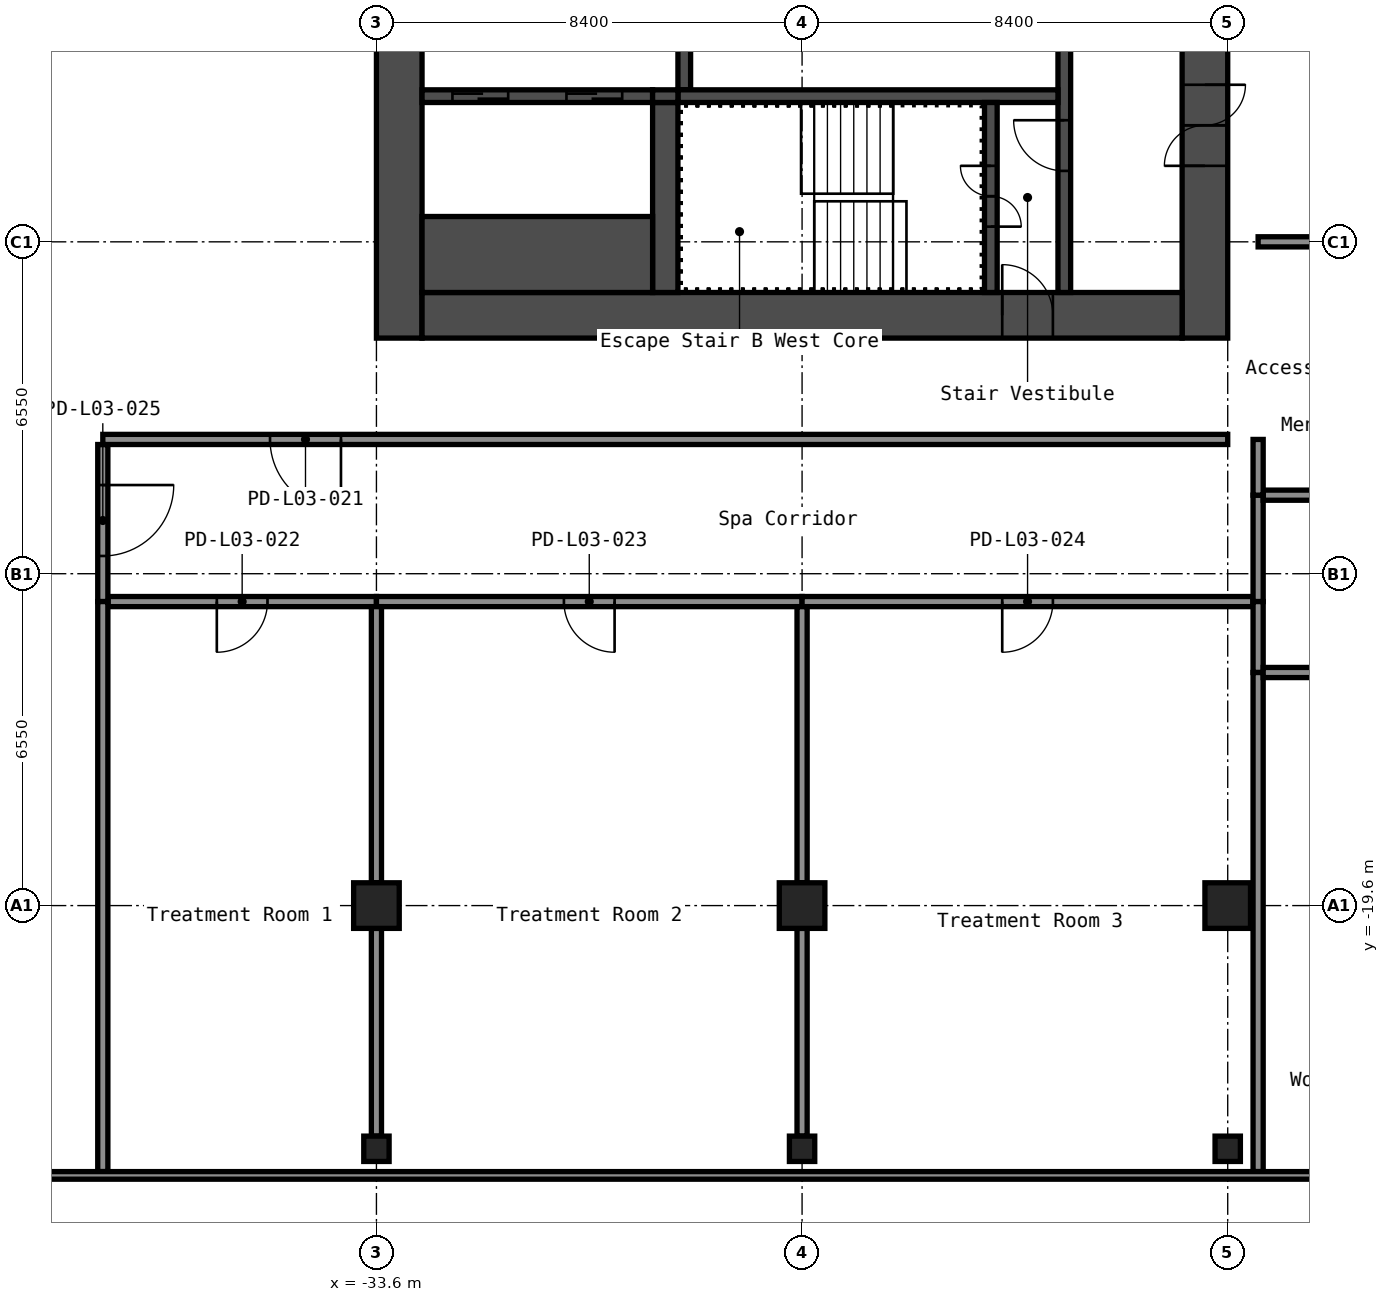
"""IFC4 building model, lengths in metres.
Left out: names, types, materials, properties, quantities, classifications, styles, units other than length and angle.
Written with IfcOpenShell. Run it as: python <this file> out.ifc"""

import sys

from ifc_helpers import new_model, si_unit, direction, frame, frame_2d, origin, origin_2d, place, context, subcontext, project, spatial, rectangle, hollow_rectangle, extrude, element, fill, save


model = new_model("IFC4")
c1 = context("Model", 3, precision=1e-05, world=origin(), true_north=direction((0.0, 1.0)))
c2 = subcontext(c1, "Body", "Model", "MODEL_VIEW")
j1 = project(units=[si_unit("LENGTHUNIT", "METRE"), si_unit("PLANEANGLEUNIT", "RADIAN")], contexts=[c1])
p1 = place(None, origin())
s1 = spatial("IfcSite", under=j1, at=p1, CompositionType="ELEMENT")
p2 = place(p1, origin())
s2 = spatial("IfcBuilding", under=s1, at=p2, CompositionType="ELEMENT")
p3 = place(p2, frame((0.0, 0.0, 15.0)))
s3 = spatial("IfcBuildingStorey", under=s2, at=p3, CompositionType="ELEMENT", Elevation=15.0)
for number, where, z_axis, x_axis in (
    (1, (-33.6, -19.6, 0.0), (0.0, 0.0, 1.0), (1.0, 0.0, 0.0)),
    (2, (-25.2, -19.6, 0.0), (0.0, 0.0, 1.0), (1.0, 0.0, 0.0)),
    (3, (-16.8, -19.6, 0.0), (0.0, 0.0, 1.0), (1.0, 0.0, 0.0)),
):
    element("IfcColumn", number, at=place(p3, frame(where, z_axis=z_axis, x_axis=x_axis)), inside=s3, PredefinedType="COLUMN", context=c2, shape_type="SweptSolid", body=[
        extrude(hollow_rectangle(XDim=0.9, YDim=0.9, WallThickness=0.036, at=origin_2d()), origin(), (0.0, 0.0, 1.0), 4.4),
    ])
for number, where, z_axis, x_axis in (
    (4, (-33.6, -24.4, 0.0), (0.0, 0.0, 1.0), (1.0, 0.0, 0.0)),
    (5, (-25.2, -24.4, 0.0), (0.0, 0.0, 1.0), (1.0, 0.0, 0.0)),
    (6, (-16.8, -24.4, 0.0), (0.0, 0.0, 1.0), (1.0, 0.0, 0.0)),
):
    element("IfcColumn", number, at=place(p3, frame(where, z_axis=z_axis, x_axis=x_axis)), inside=s3, PredefinedType="COLUMN", context=c2, shape_type="SweptSolid", body=[
        extrude(hollow_rectangle(XDim=0.5, YDim=0.5, WallThickness=0.019, InnerFilletRadius=0.029, OuterFilletRadius=0.048, at=origin_2d()), origin(), (0.0, 0.0, 1.0), 4.4),
    ])
p4 = place(p3, frame((-17.25, -8.4, 0.0), z_axis=(0.0, 0.0, 1.0), x_axis=(0.0, 1.0, 0.0)))
e7 = element("IfcWall", 7, at=p4, inside=s3, PredefinedType="SHEAR", context=c2, shape_type="SweptSolid", body=[
    extrude(rectangle(XDim=16.8, YDim=0.9, at=frame_2d((8.4, 0.0))), origin(), (0.0, 0.0, 1.0), 4.4),
])
p5 = place(p4, frame((3.4, 0.0, 0.0)))
e8 = element("IfcOpeningElement", 8, at=p5, cuts=e7, PredefinedType="OPENING", context=c2, shape_type="SweptSolid", body=[
    extrude(rectangle(XDim=1.6, YDim=2.1, at=frame_2d((0.8, 1.05))), frame((0.0, 0.46, 0.0), z_axis=(0.0, -1.0, 0.0), x_axis=(1.0, 0.0, 0.0)), (0.0, 0.0, 1.0), 0.92),
])
p6 = place(p4, frame((9.6, 0.0, 0.0)))
e9 = element("IfcOpeningElement", 9, at=p6, cuts=e7, PredefinedType="OPENING", context=c2, shape_type="SweptSolid", body=[
    extrude(rectangle(XDim=1.6, YDim=2.1, at=frame_2d((0.8, 1.05))), frame((0.0, 0.46, 0.0), z_axis=(0.0, -1.0, 0.0), x_axis=(1.0, 0.0, 0.0)), (0.0, 0.0, 1.0), 0.92),
])
p7 = place(p4, frame((11.8, 0.0, 0.0)))
e10 = element("IfcOpeningElement", 10, at=p7, cuts=e7, PredefinedType="OPENING", context=c2, shape_type="SweptSolid", body=[
    extrude(rectangle(XDim=1.6, YDim=2.1, at=frame_2d((0.8, 1.05))), frame((0.0, 0.46, 0.0), z_axis=(0.0, -1.0, 0.0), x_axis=(1.0, 0.0, 0.0)), (0.0, 0.0, 1.0), 0.92),
])
p8 = place(p3, frame((-33.15, -8.4, 0.0), z_axis=(0.0, 0.0, 1.0), x_axis=(0.0, 1.0, 0.0)))
e11 = element("IfcWall", 11, at=p8, inside=s3, PredefinedType="SHEAR", context=c2, shape_type="SweptSolid", body=[
    extrude(rectangle(XDim=16.8, YDim=0.9, at=frame_2d((8.4, 0.0))), origin(), (0.0, 0.0, 1.0), 4.4),
])
p9 = place(p3, frame((-32.7, -7.95, 0.0), z_axis=(0.0, 0.0, 1.0), x_axis=(1.0, 0.0, 0.0)))
e12 = element("IfcWall", 12, at=p9, inside=s3, PredefinedType="SHEAR", context=c2, shape_type="SweptSolid", body=[
    extrude(rectangle(XDim=15.0, YDim=0.9, at=frame_2d((7.5, 0.0))), origin(), (0.0, 0.0, 1.0), 4.4),
])
p10 = place(p9, frame((11.45, 0.0, 0.0)))
e13 = element("IfcOpeningElement", 13, at=p10, cuts=e12, PredefinedType="OPENING", context=c2, shape_type="SweptSolid", body=[
    extrude(rectangle(XDim=1.0, YDim=2.1, at=frame_2d((0.5, 1.05))), frame((0.0, 0.46, 0.0), z_axis=(0.0, -1.0, 0.0), x_axis=(1.0, 0.0, 0.0)), (0.0, 0.0, 1.0), 0.92),
])
p11 = place(p3, frame((-20.025, -7.5, 0.0), z_axis=(0.0, 0.0, 1.0), x_axis=(0.0, 1.0, 0.0)))
e14 = element("IfcWall", 14, at=p11, inside=s3, PredefinedType="SHEAR", context=c2, shape_type="SweptSolid", body=[
    extrude(rectangle(XDim=6.3, YDim=0.25, at=frame_2d((3.15, 0.0))), origin(), (0.0, 0.0, 1.0), 4.4),
])
p12 = place(p11, frame((2.4, 0.0, 0.0)))
e15 = element("IfcOpeningElement", 15, at=p12, cuts=e14, PredefinedType="OPENING", context=c2, shape_type="SweptSolid", body=[
    extrude(rectangle(XDim=1.0, YDim=2.1, at=frame_2d((0.5, 1.05))), frame((0.0, 0.135, 0.0), z_axis=(0.0, -1.0, 0.0), x_axis=(1.0, 0.0, 0.0)), (0.0, 0.0, 1.0), 0.27),
])
p13 = place(p3, frame((-27.525, -3.5, 0.0), z_axis=(0.0, 0.0, 1.0), x_axis=(0.0, 1.0, 0.0)))
e16 = element("IfcWall", 16, at=p13, inside=s3, PredefinedType="SHEAR", context=c2, shape_type="SweptSolid", body=[
    extrude(rectangle(XDim=2.05, YDim=0.25, at=frame_2d((1.025, 0.0))), origin(), (0.0, 0.0, 1.0), 4.4),
])
p14 = place(p3, frame((-27.65, -3.625, 0.0), z_axis=(0.0, 0.0, 1.0), x_axis=(1.0, 0.0, 0.0)))
e17 = element("IfcWall", 17, at=p14, inside=s3, PredefinedType="SHEAR", context=c2, shape_type="SweptSolid", body=[
    extrude(rectangle(XDim=7.5, YDim=0.25, at=frame_2d((3.75, 0.0))), origin(), (0.0, 0.0, 1.0), 4.4),
])
p15 = place(p3, frame((-21.475, -7.5, 0.0), z_axis=(0.0, 0.0, 1.0), x_axis=(0.0, 1.0, 0.0)))
e18 = element("IfcWall", 18, at=p15, inside=s3, PredefinedType="SHEAR", context=c2, shape_type="SweptSolid", body=[
    extrude(rectangle(XDim=3.75, YDim=0.25, at=frame_2d((1.875, 0.0))), origin(), (0.0, 0.0, 1.0), 4.4),
])
p16 = place(p15, frame((1.3, 0.0, 0.0)))
e19 = element("IfcOpeningElement", 19, at=p16, cuts=e18, PredefinedType="OPENING", context=c2, shape_type="SweptSolid", body=[
    extrude(rectangle(XDim=1.2, YDim=2.1, at=frame_2d((0.6, 1.05))), frame((0.0, 0.135, 0.0), z_axis=(0.0, -1.0, 0.0), x_axis=(1.0, 0.0, 0.0)), (0.0, 0.0, 1.0), 0.27),
])
p17 = place(p3, frame((-27.9, -7.5, 0.0), z_axis=(0.0, 0.0, 1.0), x_axis=(0.0, 1.0, 0.0)))
e20 = element("IfcWall", 20, at=p17, inside=s3, PredefinedType="SHEAR", context=c2, shape_type="SweptSolid", body=[
    extrude(rectangle(XDim=3.75, YDim=0.5, at=frame_2d((1.875, 0.0))), origin(), (0.0, 0.0, 1.0), 4.4),
])
p18 = place(p3, frame((-32.7, -3.625, 0.0), z_axis=(0.0, 0.0, 1.0), x_axis=(1.0, 0.0, 0.0)))
e21 = element("IfcWall", 21, at=p18, inside=s3, PredefinedType="SHEAR", context=c2, shape_type="SweptSolid", body=[
    extrude(rectangle(XDim=4.55, YDim=0.25, at=frame_2d((2.275, 0.0))), origin(), (0.0, 0.0, 1.0), 4.4),
])
p19 = place(p18, frame((2.85, 0.0, 0.0)))
e22 = element("IfcOpeningElement", 22, at=p19, cuts=e21, PredefinedType="OPENING", context=c2, shape_type="SweptSolid", body=[
    extrude(rectangle(XDim=1.1, YDim=2.1, at=frame_2d((0.55, 1.05))), frame((0.0, 0.135, 0.0), z_axis=(0.0, -1.0, 0.0), x_axis=(1.0, 0.0, 0.0)), (0.0, 0.0, 1.0), 0.27),
])
p20 = place(p18, frame((0.6, 0.0, 0.0)))
e23 = element("IfcOpeningElement", 23, at=p20, cuts=e21, PredefinedType="OPENING", context=c2, shape_type="SweptSolid", body=[
    extrude(rectangle(XDim=1.1, YDim=2.1, at=frame_2d((0.55, 1.05))), frame((0.0, 0.135, 0.0), z_axis=(0.0, -1.0, 0.0), x_axis=(1.0, 0.0, 0.0)), (0.0, 0.0, 1.0), 0.27),
])
p21 = place(p3, frame((-32.7, -6.75, 0.0), z_axis=(0.0, 0.0, 1.0), x_axis=(1.0, 0.0, 0.0)))
e24 = element("IfcWall", 24, at=p21, inside=s3, PredefinedType="SHEAR", context=c2, shape_type="SweptSolid", body=[
    extrude(rectangle(XDim=4.55, YDim=1.5, at=frame_2d((2.275, 0.0))), origin(), (0.0, 0.0, 1.0), 4.4),
])
p22 = place(p3, frame((-28.15, -3.625, 0.0), z_axis=(0.0, 0.0, 1.0), x_axis=(1.0, 0.0, 0.0)))
e25 = element("IfcWall", 25, at=p22, inside=s3, PredefinedType="SHEAR", context=c2, shape_type="SweptSolid", body=[
    extrude(rectangle(XDim=0.5, YDim=0.25, at=frame_2d((0.25, 0.0))), origin(), (0.0, 0.0, 1.0), 4.4),
])
p23 = place(p3, frame((-33.6, -13.6, 0.0), z_axis=(0.0, 0.0, 1.0), x_axis=(-1.0, 0.0, 0.0)))
e26 = element("IfcWall", 26, at=p23, inside=s3, PredefinedType="PARTITIONING", context=c2, shape_type="SweptSolid", body=[
    extrude(rectangle(XDim=5.3, YDim=0.2, at=frame_2d((2.65, 0.0))), origin(), (0.0, 0.0, 1.0), 4.4),
])
p24 = place(p23, frame((2.15, 0.0, 0.0)))
e27 = element("IfcOpeningElement", 27, at=p24, cuts=e26, PredefinedType="OPENING", context=c2, shape_type="SweptSolid", body=[
    extrude(rectangle(XDim=1.0, YDim=2.1, at=frame_2d((0.5, 1.05))), frame((0.0, 0.11, 0.0), z_axis=(0.0, -1.0, 0.0), x_axis=(1.0, 0.0, 0.0)), (0.0, 0.0, 1.0), 0.22),
])
p25 = place(p3, frame((-25.2, -13.6, 0.0), z_axis=(0.0, 0.0, 1.0), x_axis=(-1.0, 0.0, 0.0)))
e28 = element("IfcWall", 28, at=p25, inside=s3, PredefinedType="PARTITIONING", context=c2, shape_type="SweptSolid", body=[
    extrude(rectangle(XDim=8.4, YDim=0.2, at=frame_2d((4.2, 0.0))), origin(), (0.0, 0.0, 1.0), 4.4),
])
p26 = place(p25, frame((3.7, 0.0, 0.0)))
e29 = element("IfcOpeningElement", 29, at=p26, cuts=e28, PredefinedType="OPENING", context=c2, shape_type="SweptSolid", body=[
    extrude(rectangle(XDim=1.0, YDim=2.1, at=frame_2d((0.5, 1.05))), frame((0.0, 0.11, 0.0), z_axis=(0.0, -1.0, 0.0), x_axis=(1.0, 0.0, 0.0)), (0.0, 0.0, 1.0), 0.22),
])
p27 = place(p3, frame((-16.3, -13.6, 0.0), z_axis=(0.0, 0.0, 1.0), x_axis=(-1.0, 0.0, 0.0)))
e30 = element("IfcWall", 30, at=p27, inside=s3, PredefinedType="PARTITIONING", context=c2, shape_type="SweptSolid", body=[
    extrude(rectangle(XDim=8.9, YDim=0.2, at=frame_2d((4.45, 0.0))), origin(), (0.0, 0.0, 1.0), 4.4),
])
p28 = place(p27, frame((3.95, 0.0, 0.0)))
e31 = element("IfcOpeningElement", 31, at=p28, cuts=e30, PredefinedType="OPENING", context=c2, shape_type="SweptSolid", body=[
    extrude(rectangle(XDim=1.0, YDim=2.1, at=frame_2d((0.5, 1.05))), frame((0.0, 0.11, 0.0), z_axis=(0.0, -1.0, 0.0), x_axis=(1.0, 0.0, 0.0)), (0.0, 0.0, 1.0), 0.22),
])
p29 = place(p3, frame((-33.6, -13.7, 0.0), z_axis=(0.0, 0.0, 1.0), x_axis=(0.0, -1.0, 0.0)))
e32 = element("IfcWall", 32, at=p29, inside=s3, PredefinedType="PARTITIONING", context=c2, shape_type="SweptSolid", body=[
    extrude(rectangle(XDim=5.45, YDim=0.2, at=frame_2d((2.725, 0.0))), origin(), (0.0, 0.0, 1.0), 4.4),
])
p30 = place(p3, frame((-33.6, -20.05, 0.0), z_axis=(0.0, 0.0, 1.0), x_axis=(0.0, -1.0, 0.0)))
e33 = element("IfcWall", 33, at=p30, inside=s3, PredefinedType="PARTITIONING", context=c2, shape_type="SweptSolid", body=[
    extrude(rectangle(XDim=4.1, YDim=0.2, at=frame_2d((2.05, 0.0))), origin(), (0.0, 0.0, 1.0), 4.4),
])
p31 = place(p3, frame((-25.2, -13.7, 0.0), z_axis=(0.0, 0.0, 1.0), x_axis=(0.0, -1.0, 0.0)))
e34 = element("IfcWall", 34, at=p31, inside=s3, PredefinedType="PARTITIONING", context=c2, shape_type="SweptSolid", body=[
    extrude(rectangle(XDim=5.45, YDim=0.2, at=frame_2d((2.725, 0.0))), origin(), (0.0, 0.0, 1.0), 4.4),
])
p32 = place(p3, frame((-25.2, -20.05, 0.0), z_axis=(0.0, 0.0, 1.0), x_axis=(0.0, -1.0, 0.0)))
e35 = element("IfcWall", 35, at=p32, inside=s3, PredefinedType="PARTITIONING", context=c2, shape_type="SweptSolid", body=[
    extrude(rectangle(XDim=4.1, YDim=0.2, at=frame_2d((2.05, 0.0))), origin(), (0.0, 0.0, 1.0), 4.4),
])
p33 = place(p3, frame((-16.2, -13.6, 0.0), z_axis=(0.0, 0.0, 1.0), x_axis=(0.0, 1.0, 0.0)))
e36 = element("IfcWall", 36, at=p33, inside=s3, PredefinedType="PARTITIONING", context=c2, shape_type="SweptSolid", body=[
    extrude(rectangle(XDim=2.1, YDim=0.2, at=frame_2d((1.05, 0.0))), origin(), (0.0, 0.0, 1.0), 4.4),
])
p34 = place(p3, frame((-16.2, -15.0, 0.0), z_axis=(0.0, 0.0, 1.0), x_axis=(0.0, 1.0, 0.0)))
e37 = element("IfcWall", 37, at=p34, inside=s3, PredefinedType="PARTITIONING", context=c2, shape_type="SweptSolid", body=[
    extrude(rectangle(XDim=1.4, YDim=0.2, at=frame_2d((0.7, 0.0))), origin(), (0.0, 0.0, 1.0), 4.4),
])
p35 = place(p3, frame((-16.1, -11.5, 0.0), z_axis=(0.0, 0.0, 1.0), x_axis=(1.0, 0.0, 0.0)))
e38 = element("IfcWall", 38, at=p35, inside=s3, PredefinedType="PARTITIONING", context=c2, shape_type="SweptSolid", body=[
    extrude(rectangle(XDim=3.4, YDim=0.2, at=frame_2d((1.7, 0.0))), origin(), (0.0, 0.0, 1.0), 4.4),
])
p36 = place(p3, frame((-16.2, -6.5, 0.0), z_axis=(0.0, 0.0, 1.0), x_axis=(1.0, 0.0, 0.0)))
e39 = element("IfcWall", 39, at=p36, inside=s3, PredefinedType="PARTITIONING", context=c2, shape_type="SweptSolid", body=[
    extrude(rectangle(XDim=3.6, YDim=0.2, at=frame_2d((1.8, 0.0))), origin(), (0.0, 0.0, 1.0), 4.4),
])
p37 = place(p3, frame((-16.2, -11.5, 0.0), z_axis=(0.0, 0.0, 1.0), x_axis=(0.0, 1.0, 0.0)))
e40 = element("IfcWall", 40, at=p37, inside=s3, PredefinedType="PARTITIONING", context=c2, shape_type="SweptSolid", body=[
    extrude(rectangle(XDim=1.1, YDim=0.2, at=frame_2d((0.55, 0.0))), origin(), (0.0, 0.0, 1.0), 4.4),
])
p38 = place(p3, frame((-16.2, -24.85, 0.0), z_axis=(0.0, 0.0, 1.0), x_axis=(0.0, 1.0, 0.0)))
e41 = element("IfcWall", 41, at=p38, inside=s3, PredefinedType="PARTITIONING", context=c2, shape_type="SweptSolid", body=[
    extrude(rectangle(XDim=9.85, YDim=0.2, at=frame_2d((4.925, 0.0))), origin(), (0.0, 0.0, 1.0), 4.4),
])
p39 = place(p3, frame((-16.1, -15.0, 0.0), z_axis=(0.0, 0.0, 1.0), x_axis=(1.0, 0.0, 0.0)))
e42 = element("IfcWall", 42, at=p39, inside=s3, PredefinedType="PARTITIONING", context=c2, shape_type="SweptSolid", body=[
    extrude(rectangle(XDim=3.4, YDim=0.2, at=frame_2d((1.7, 0.0))), origin(), (0.0, 0.0, 1.0), 4.4),
])
p40 = place(p3, frame((-39.0, -10.5, 0.0), z_axis=(0.0, 0.0, 1.0), x_axis=(0.0, -1.0, 0.0)))
e43 = element("IfcWall", 43, at=p40, inside=s3, PredefinedType="PARTITIONING", context=c2, shape_type="SweptSolid", body=[
    extrude(rectangle(XDim=3.1, YDim=0.2, at=frame_2d((1.55, 0.0))), origin(), (0.0, 0.0, 1.0), 4.4),
])
p41 = place(p40, frame((0.8, 0.0, 0.0)))
e44 = element("IfcOpeningElement", 44, at=p41, cuts=e43, PredefinedType="OPENING", context=c2, shape_type="SweptSolid", body=[
    extrude(rectangle(XDim=1.4, YDim=2.1, at=frame_2d((0.7, 1.05))), frame((0.0, 0.11, 0.0), z_axis=(0.0, -1.0, 0.0), x_axis=(1.0, 0.0, 0.0)), (0.0, 0.0, 1.0), 0.22),
])
p42 = place(p3, frame((-16.8, -10.4, 0.0), z_axis=(0.0, 0.0, 1.0), x_axis=(-1.0, 0.0, 0.0)))
e45 = element("IfcWall", 45, at=p42, inside=s3, PredefinedType="PARTITIONING", context=c2, shape_type="SweptSolid", body=[
    extrude(rectangle(XDim=22.2, YDim=0.2, at=frame_2d((11.1, 0.0))), origin(), (0.0, 0.0, 1.0), 4.4),
])
p43 = place(p42, frame((17.5, 0.0, 0.0)))
e46 = element("IfcOpeningElement", 46, at=p43, cuts=e45, PredefinedType="OPENING", context=c2, shape_type="SweptSolid", body=[
    extrude(rectangle(XDim=1.4, YDim=2.1, at=frame_2d((0.7, 1.05))), frame((0.0, 0.11, 0.0), z_axis=(0.0, -1.0, 0.0), x_axis=(1.0, 0.0, 0.0)), (0.0, 0.0, 1.0), 0.22),
])
p44 = place(p3, frame((-39.0, -13.6, 0.0), z_axis=(0.0, 0.0, 1.0), x_axis=(0.0, -1.0, 0.0)))
e47 = element("IfcWall", 47, at=p44, inside=s3, PredefinedType="PARTITIONING", context=c2, shape_type="SweptSolid", body=[
    extrude(rectangle(XDim=11.25, YDim=0.2, at=frame_2d((5.625, 0.0))), origin(), (0.0, 0.0, 1.0), 4.4),
])
p45 = place(p3, frame((-8.4, -24.925, 0.0), z_axis=(0.0, 0.0, 1.0), x_axis=(-1.0, 0.0, 0.0)))
e48 = element("IfcWall", 48, at=p45, inside=s3, PredefinedType="STANDARD", context=c2, shape_type="SweptSolid", body=[
    extrude(rectangle(XDim=43.58, YDim=0.15, at=frame_2d((21.79, 0.0))), origin(), (0.0, 0.0, 1.0), 4.4),
])
p46 = place(p5, origin())
e49 = element("IfcDoor", 49, at=p46, inside=s3, OperationType="DOUBLE_DOOR_SINGLE_SWING", PredefinedType="DOOR", context=c2, shape_type="SweptSolid", body=[
    extrude(rectangle(XDim=1.6, YDim=2.1, at=frame_2d((0.8, 1.05))), frame((0.0, 0.025, 0.0), z_axis=(0.0, -1.0, 0.0), x_axis=(1.0, 0.0, 0.0)), (0.0, 0.0, 1.0), 0.05),
])
fill(e8, e49)
p47 = place(p10, origin())
e50 = element("IfcDoor", 50, at=p47, inside=s3, OperationType="SINGLE_SWING_RIGHT", PredefinedType="DOOR", context=c2, shape_type="SweptSolid", body=[
    extrude(rectangle(XDim=1.0, YDim=2.1, at=frame_2d((0.5, 1.05))), frame((0.0, 0.025, 0.0), z_axis=(0.0, -1.0, 0.0), x_axis=(1.0, 0.0, 0.0)), (0.0, 0.0, 1.0), 0.05),
])
fill(e13, e50)
p48 = place(p16, origin())
e51 = element("IfcDoor", 51, at=p48, inside=s3, OperationType="DOUBLE_DOOR_SINGLE_SWING", PredefinedType="DOOR", context=c2, shape_type="SweptSolid", body=[
    extrude(rectangle(XDim=1.2, YDim=2.1, at=frame_2d((0.6, 1.05))), frame((0.0, 0.025, 0.0), z_axis=(0.0, -1.0, 0.0), x_axis=(1.0, 0.0, 0.0)), (0.0, 0.0, 1.0), 0.05),
])
fill(e19, e51)
p49 = place(p12, origin())
e52 = element("IfcDoor", 52, at=p49, inside=s3, OperationType="SINGLE_SWING_LEFT", PredefinedType="DOOR", context=c2, shape_type="SweptSolid", body=[
    extrude(rectangle(XDim=1.0, YDim=2.1, at=frame_2d((0.5, 1.05))), frame((0.0, 0.025, 0.0), z_axis=(0.0, -1.0, 0.0), x_axis=(1.0, 0.0, 0.0)), (0.0, 0.0, 1.0), 0.05),
])
fill(e15, e52)
p50 = place(p19, origin())
e53 = element("IfcDoor", 53, at=p50, inside=s3, OperationType="DOUBLE_DOOR_SLIDING", PredefinedType="DOOR", context=c2, shape_type="SweptSolid", body=[
    extrude(rectangle(XDim=1.1, YDim=2.1, at=frame_2d((0.55, 1.05))), frame((0.0, 0.025, 0.0), z_axis=(0.0, -1.0, 0.0), x_axis=(1.0, 0.0, 0.0)), (0.0, 0.0, 1.0), 0.05),
])
fill(e22, e53)
p51 = place(p20, origin())
e54 = element("IfcDoor", 54, at=p51, inside=s3, OperationType="DOUBLE_DOOR_SLIDING", PredefinedType="DOOR", context=c2, shape_type="SweptSolid", body=[
    extrude(rectangle(XDim=1.1, YDim=2.1, at=frame_2d((0.55, 1.05))), frame((0.0, 0.025, 0.0), z_axis=(0.0, -1.0, 0.0), x_axis=(1.0, 0.0, 0.0)), (0.0, 0.0, 1.0), 0.05),
])
fill(e23, e54)
p52 = place(p43, origin())
e55 = element("IfcDoor", 55, at=p52, inside=s3, OperationType="SINGLE_SWING_RIGHT", PredefinedType="DOOR", context=c2, shape_type="SweptSolid", body=[
    extrude(rectangle(XDim=1.4, YDim=2.1, at=frame_2d((0.7, 1.05))), frame((0.0, 0.025, 0.0), z_axis=(0.0, -1.0, 0.0), x_axis=(1.0, 0.0, 0.0)), (0.0, 0.0, 1.0), 0.05),
])
fill(e46, e55)
p53 = place(p24, origin())
e56 = element("IfcDoor", 56, at=p53, inside=s3, OperationType="SINGLE_SWING_LEFT", PredefinedType="DOOR", context=c2, shape_type="SweptSolid", body=[
    extrude(rectangle(XDim=1.0, YDim=2.1, at=frame_2d((0.5, 1.05))), frame((0.0, 0.025, 0.0), z_axis=(0.0, -1.0, 0.0), x_axis=(1.0, 0.0, 0.0)), (0.0, 0.0, 1.0), 0.05),
])
fill(e27, e56)
p54 = place(p26, origin())
e57 = element("IfcDoor", 57, at=p54, inside=s3, OperationType="SINGLE_SWING_RIGHT", PredefinedType="DOOR", context=c2, shape_type="SweptSolid", body=[
    extrude(rectangle(XDim=1.0, YDim=2.1, at=frame_2d((0.5, 1.05))), frame((0.0, 0.025, 0.0), z_axis=(0.0, -1.0, 0.0), x_axis=(1.0, 0.0, 0.0)), (0.0, 0.0, 1.0), 0.05),
])
fill(e29, e57)
p55 = place(p28, origin())
e58 = element("IfcDoor", 58, at=p55, inside=s3, OperationType="SINGLE_SWING_LEFT", PredefinedType="DOOR", context=c2, shape_type="SweptSolid", body=[
    extrude(rectangle(XDim=1.0, YDim=2.1, at=frame_2d((0.5, 1.05))), frame((0.0, 0.025, 0.0), z_axis=(0.0, -1.0, 0.0), x_axis=(1.0, 0.0, 0.0)), (0.0, 0.0, 1.0), 0.05),
])
fill(e31, e58)
p56 = place(p41, origin())
e59 = element("IfcDoor", 59, at=p56, inside=s3, OperationType="SINGLE_SWING_RIGHT", PredefinedType="DOOR", context=c2, shape_type="SweptSolid", body=[
    extrude(rectangle(XDim=1.4, YDim=2.1, at=frame_2d((0.7, 1.05))), frame((0.0, 0.025, 0.0), z_axis=(0.0, -1.0, 0.0), x_axis=(1.0, 0.0, 0.0)), (0.0, 0.0, 1.0), 0.05),
])
fill(e44, e59)
save(model, sys.argv[1])
